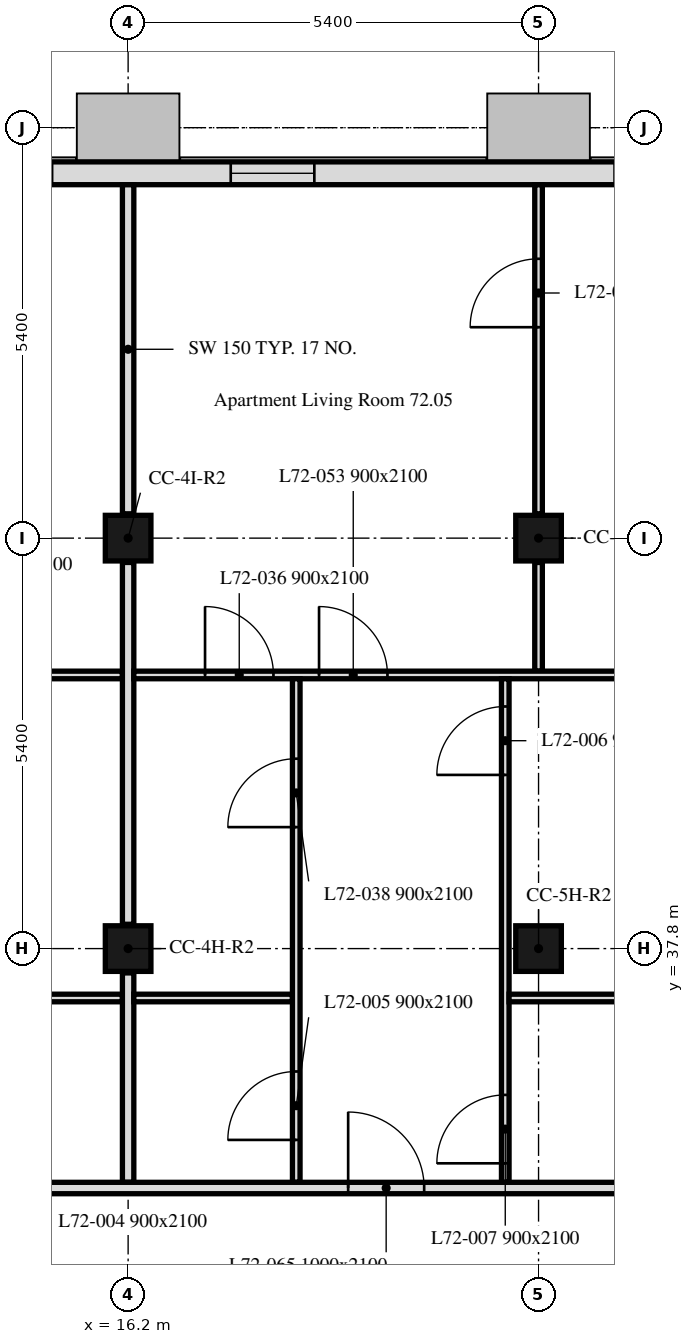
"""IFC4 building model, lengths in metres.
Left out: names, types, materials, properties, quantities, classifications, styles, units other than length and angle.
Written with IfcOpenShell. Run it as: python <this file> out.ifc"""

import sys

from ifc_helpers import new_model, si_unit, direction, frame, frame_2d, origin, origin_2d, place, context, subcontext, project, spatial, rectangle, extrude, element, fill, save


model = new_model("IFC4")
c1 = context("Model", 3, precision=1e-05, world=origin(), true_north=direction((0.0, 1.0)))
c2 = subcontext(c1, "Body", "Model", "MODEL_VIEW")
j1 = project(units=[si_unit("LENGTHUNIT", "METRE"), si_unit("PLANEANGLEUNIT", "RADIAN")], contexts=[c1])
p1 = place(None, origin())
s1 = spatial("IfcSite", under=j1, at=p1, CompositionType="ELEMENT")
p2 = place(p1, origin())
s2 = spatial("IfcBuilding", under=s1, at=p2, CompositionType="ELEMENT")
p3 = place(p2, frame((0.0, 0.0, 291.7)))
s3 = spatial("IfcBuildingStorey", under=s2, at=p3, CompositionType="ELEMENT", Elevation=291.7)
for number, where, z_axis, x_axis in (
    (1, (16.2, 37.8, 0.0), (0.0, 0.0, 1.0), (1.0, 0.0, 0.0)),
    (2, (21.6, 37.8, 0.0), (0.0, 0.0, 1.0), (1.0, 0.0, 0.0)),
    (3, (16.2, 43.2, 0.0), (0.0, 0.0, 1.0), (1.0, 0.0, 0.0)),
    (4, (21.6, 43.2, 0.0), (0.0, 0.0, 1.0), (1.0, 0.0, 0.0)),
):
    element("IfcColumn", number, at=place(p3, frame(where, z_axis=z_axis, x_axis=x_axis)), inside=s3, PredefinedType="COLUMN", context=c2, shape_type="SweptSolid", body=[
        extrude(rectangle(XDim=0.6, YDim=0.6, at=origin_2d()), origin(), (0.0, 0.0, 1.0), 3.0),
    ])
p4 = place(p3, frame((43.014, 48.0, 0.0), z_axis=(0.0, 0.0, 1.0), x_axis=(-1.0, 0.0, 0.0)))
e5 = element("IfcWall", 5, at=p4, inside=s3, PredefinedType="SOLIDWALL", context=c2, shape_type="SweptSolid", body=[
    extrude(rectangle(XDim=32.027, YDim=0.3, at=frame_2d((16.014, 0.0))), origin(), (0.0, 0.0, 1.0), 3.0),
])
p5 = place(p4, frame((2.764, 0.0, 0.9)))
e6 = element("IfcOpeningElement", 6, at=p5, cuts=e5, PredefinedType="OPENING", context=c2, shape_type="SweptSolid", body=[
    extrude(rectangle(XDim=1.1, YDim=1.7, at=frame_2d((0.55, 0.85))), frame((0.0, 0.16, 0.0), z_axis=(0.0, -1.0, 0.0), x_axis=(1.0, 0.0, 0.0)), (0.0, 0.0, 1.0), 0.32),
])
p6 = place(p4, frame((6.214, 0.0, 0.9)))
e7 = element("IfcOpeningElement", 7, at=p6, cuts=e5, PredefinedType="OPENING", context=c2, shape_type="SweptSolid", body=[
    extrude(rectangle(XDim=3.4, YDim=1.7, at=frame_2d((1.7, 0.85))), frame((0.0, 0.16, 0.0), z_axis=(0.0, -1.0, 0.0), x_axis=(1.0, 0.0, 0.0)), (0.0, 0.0, 1.0), 0.32),
])
p7 = place(p4, frame((13.564, 0.0, 0.9)))
e8 = element("IfcOpeningElement", 8, at=p7, cuts=e5, PredefinedType="OPENING", context=c2, shape_type="SweptSolid", body=[
    extrude(rectangle(XDim=1.1, YDim=1.7, at=frame_2d((0.55, 0.85))), frame((0.0, 0.16, 0.0), z_axis=(0.0, -1.0, 0.0), x_axis=(1.0, 0.0, 0.0)), (0.0, 0.0, 1.0), 0.32),
])
p8 = place(p4, frame((17.014, 0.0, 0.9)))
e9 = element("IfcOpeningElement", 9, at=p8, cuts=e5, PredefinedType="OPENING", context=c2, shape_type="SweptSolid", body=[
    extrude(rectangle(XDim=3.4, YDim=1.7, at=frame_2d((1.7, 0.85))), frame((0.0, 0.16, 0.0), z_axis=(0.0, -1.0, 0.0), x_axis=(1.0, 0.0, 0.0)), (0.0, 0.0, 1.0), 0.32),
])
p9 = place(p4, frame((24.364, 0.0, 0.9)))
e10 = element("IfcOpeningElement", 10, at=p9, cuts=e5, PredefinedType="OPENING", context=c2, shape_type="SweptSolid", body=[
    extrude(rectangle(XDim=1.1, YDim=1.7, at=frame_2d((0.55, 0.85))), frame((0.0, 0.16, 0.0), z_axis=(0.0, -1.0, 0.0), x_axis=(1.0, 0.0, 0.0)), (0.0, 0.0, 1.0), 0.32),
])
p10 = place(p4, frame((27.814, 0.0, 0.9)))
e11 = element("IfcOpeningElement", 11, at=p10, cuts=e5, PredefinedType="OPENING", context=c2, shape_type="SweptSolid", body=[
    extrude(rectangle(XDim=3.4, YDim=1.7, at=frame_2d((1.7, 0.85))), frame((0.0, 0.16, 0.0), z_axis=(0.0, -1.0, 0.0), x_axis=(1.0, 0.0, 0.0)), (0.0, 0.0, 1.0), 0.32),
])
p11 = place(p3, frame((10.89, 41.4, 0.0), z_axis=(0.0, 0.0, 1.0), x_axis=(1.0, 0.0, 0.0)))
e12 = element("IfcWall", 12, at=p11, inside=s3, PredefinedType="PARTITIONING", context=c2, shape_type="SweptSolid", body=[
    extrude(rectangle(XDim=5.235, YDim=0.1, at=frame_2d((2.618, 0.0))), origin(), (0.0, 0.0, 1.0), 3.0),
])
p12 = place(p11, frame((3.15, 0.0, 0.0)))
e13 = element("IfcOpeningElement", 13, at=p12, cuts=e12, PredefinedType="OPENING", context=c2, shape_type="SweptSolid", body=[
    extrude(rectangle(XDim=0.9, YDim=2.1, at=frame_2d((0.45, 1.05))), frame((0.0, 0.05, 0.0), z_axis=(0.0, -1.0, 0.0), x_axis=(1.0, 0.0, 0.0)), (0.0, 0.0, 1.0), 0.1),
])
p13 = place(p3, frame((16.2, 43.52, 0.0), z_axis=(0.0, 0.0, 1.0), x_axis=(0.0, 1.0, 0.0)))
e14 = element("IfcWall", 14, at=p13, inside=s3, PredefinedType="PARTITIONING", context=c2, shape_type="SweptSolid", body=[
    extrude(rectangle(XDim=4.329, YDim=0.15, at=frame_2d((2.165, 0.0))), origin(), (0.0, 0.0, 1.0), 2.4),
])
p14 = place(p3, frame((10.99, 37.15, 0.0), z_axis=(0.0, 0.0, 1.0), x_axis=(1.0, 0.0, 0.0)))
e15 = element("IfcWall", 15, at=p14, inside=s3, PredefinedType="PARTITIONING", context=c2, shape_type="SweptSolid", body=[
    extrude(rectangle(XDim=5.135, YDim=0.1, at=frame_2d((2.567, 0.0))), origin(), (0.0, 0.0, 1.0), 3.0),
])
p15 = place(p14, frame((3.12, 0.0, 0.0)))
e16 = element("IfcOpeningElement", 16, at=p15, cuts=e15, PredefinedType="OPENING", context=c2, shape_type="SweptSolid", body=[
    extrude(rectangle(XDim=0.9, YDim=2.1, at=frame_2d((0.45, 1.05))), frame((0.0, 0.05, 0.0), z_axis=(0.0, -1.0, 0.0), x_axis=(1.0, 0.0, 0.0)), (0.0, 0.0, 1.0), 0.1),
])
p16 = place(p3, frame((16.2, 38.12, 0.0), z_axis=(0.0, 0.0, 1.0), x_axis=(0.0, 1.0, 0.0)))
e17 = element("IfcWall", 17, at=p16, inside=s3, PredefinedType="PARTITIONING", context=c2, shape_type="SweptSolid", body=[
    extrude(rectangle(XDim=4.76, YDim=0.15, at=frame_2d((2.38, 0.0))), origin(), (0.0, 0.0, 1.0), 2.4),
])
p17 = place(p3, frame((16.2, 34.725, 0.0), z_axis=(0.0, 0.0, 1.0), x_axis=(0.0, 1.0, 0.0)))
e18 = element("IfcWall", 18, at=p17, inside=s3, PredefinedType="PARTITIONING", context=c2, shape_type="SweptSolid", body=[
    extrude(rectangle(XDim=2.755, YDim=0.15, at=frame_2d((1.377, 0.0))), origin(), (0.0, 0.0, 1.0), 2.4),
])
p18 = place(p3, frame((21.6, 41.45, 0.0), z_axis=(0.0, 0.0, 1.0), x_axis=(0.0, 1.0, 0.0)))
e19 = element("IfcWall", 19, at=p18, inside=s3, PredefinedType="PARTITIONING", context=c2, shape_type="SweptSolid", body=[
    extrude(rectangle(XDim=1.43, YDim=0.1, at=frame_2d((0.715, 0.0))), origin(), (0.0, 0.0, 1.0), 2.4),
])
p19 = place(p3, frame((21.6, 43.52, 0.0), z_axis=(0.0, 0.0, 1.0), x_axis=(0.0, 1.0, 0.0)))
e20 = element("IfcWall", 20, at=p19, inside=s3, PredefinedType="PARTITIONING", context=c2, shape_type="SweptSolid", body=[
    extrude(rectangle(XDim=4.329, YDim=0.1, at=frame_2d((2.165, 0.0))), origin(), (0.0, 0.0, 1.0), 2.4),
])
p20 = place(p19, frame((2.455, 0.0, 0.0)))
e21 = element("IfcOpeningElement", 21, at=p20, cuts=e20, PredefinedType="OPENING", context=c2, shape_type="SweptSolid", body=[
    extrude(rectangle(XDim=0.9, YDim=2.1, at=frame_2d((0.45, 1.05))), frame((0.0, 0.05, 0.0), z_axis=(0.0, -1.0, 0.0), x_axis=(1.0, 0.0, 0.0)), (0.0, 0.0, 1.0), 0.1),
])
p21 = place(p3, frame((16.275, 41.4, 0.0), z_axis=(0.0, 0.0, 1.0), x_axis=(1.0, 0.0, 0.0)))
e22 = element("IfcWall", 22, at=p21, inside=s3, PredefinedType="PARTITIONING", context=c2, shape_type="SweptSolid", body=[
    extrude(rectangle(XDim=10.65, YDim=0.1, at=frame_2d((5.325, 0.0))), origin(), (0.0, 0.0, 1.0), 2.4),
])
p22 = place(p21, frame((0.937, 0.0, 0.0)))
e23 = element("IfcOpeningElement", 23, at=p22, cuts=e22, PredefinedType="OPENING", context=c2, shape_type="SweptSolid", body=[
    extrude(rectangle(XDim=0.9, YDim=2.1, at=frame_2d((0.45, 1.05))), frame((0.0, 0.05, 0.0), z_axis=(0.0, -1.0, 0.0), x_axis=(1.0, 0.0, 0.0)), (0.0, 0.0, 1.0), 0.1),
])
p23 = place(p21, frame((8.075, 0.0, 0.0)))
e24 = element("IfcOpeningElement", 24, at=p23, cuts=e22, PredefinedType="OPENING", context=c2, shape_type="SweptSolid", body=[
    extrude(rectangle(XDim=0.9, YDim=2.1, at=frame_2d((0.45, 1.05))), frame((0.0, 0.05, 0.0), z_axis=(0.0, -1.0, 0.0), x_axis=(1.0, 0.0, 0.0)), (0.0, 0.0, 1.0), 0.1),
])
p24 = place(p21, frame((2.437, 0.0, 0.0)))
e25 = element("IfcOpeningElement", 25, at=p24, cuts=e22, PredefinedType="OPENING", context=c2, shape_type="SweptSolid", body=[
    extrude(rectangle(XDim=0.9, YDim=2.1, at=frame_2d((0.45, 1.05))), frame((0.0, 0.05, 0.0), z_axis=(0.0, -1.0, 0.0), x_axis=(1.0, 0.0, 0.0)), (0.0, 0.0, 1.0), 0.1),
])
p25 = place(p3, frame((16.275, 37.15, 0.0), z_axis=(0.0, 0.0, 1.0), x_axis=(1.0, 0.0, 0.0)))
e26 = element("IfcWall", 26, at=p25, inside=s3, PredefinedType="PARTITIONING", context=c2, shape_type="SweptSolid", body=[
    extrude(rectangle(XDim=2.087, YDim=0.1, at=frame_2d((1.043, 0.0))), origin(), (0.0, 0.0, 1.0), 3.0),
])
p26 = place(p3, frame((18.412, 34.725, 0.0), z_axis=(0.0, 0.0, 1.0), x_axis=(0.0, 1.0, 0.0)))
e27 = element("IfcWall", 27, at=p26, inside=s3, PredefinedType="PARTITIONING", context=c2, shape_type="SweptSolid", body=[
    extrude(rectangle(XDim=6.625, YDim=0.1, at=frame_2d((3.312, 0.0))), origin(), (0.0, 0.0, 1.0), 3.0),
])
p27 = place(p26, frame((0.558, 0.0, 0.0)))
e28 = element("IfcOpeningElement", 28, at=p27, cuts=e27, PredefinedType="OPENING", context=c2, shape_type="SweptSolid", body=[
    extrude(rectangle(XDim=0.9, YDim=2.1, at=frame_2d((0.45, 1.05))), frame((0.0, 0.05, 0.0), z_axis=(0.0, -1.0, 0.0), x_axis=(1.0, 0.0, 0.0)), (0.0, 0.0, 1.0), 0.1),
])
p28 = place(p26, frame((4.673, 0.0, 0.0)))
e29 = element("IfcOpeningElement", 29, at=p28, cuts=e27, PredefinedType="OPENING", context=c2, shape_type="SweptSolid", body=[
    extrude(rectangle(XDim=0.9, YDim=2.1, at=frame_2d((0.45, 1.05))), frame((0.0, 0.05, 0.0), z_axis=(0.0, -1.0, 0.0), x_axis=(1.0, 0.0, 0.0)), (0.0, 0.0, 1.0), 0.1),
])
p29 = place(p3, frame((21.162, 34.725, 0.0), z_axis=(0.0, 0.0, 1.0), x_axis=(0.0, 1.0, 0.0)))
e30 = element("IfcWall", 30, at=p29, inside=s3, PredefinedType="PARTITIONING", context=c2, shape_type="SweptSolid", body=[
    extrude(rectangle(XDim=6.625, YDim=0.1, at=frame_2d((3.312, 0.0))), origin(), (0.0, 0.0, 1.0), 3.0),
])
p30 = place(p29, frame((5.36, 0.0, 0.0)))
e31 = element("IfcOpeningElement", 31, at=p30, cuts=e30, PredefinedType="OPENING", context=c2, shape_type="SweptSolid", body=[
    extrude(rectangle(XDim=0.9, YDim=2.1, at=frame_2d((0.45, 1.05))), frame((0.0, 0.05, 0.0), z_axis=(0.0, -1.0, 0.0), x_axis=(1.0, 0.0, 0.0)), (0.0, 0.0, 1.0), 0.1),
])
p31 = place(p29, frame((0.25, 0.0, 0.0)))
e32 = element("IfcOpeningElement", 32, at=p31, cuts=e30, PredefinedType="OPENING", context=c2, shape_type="SweptSolid", body=[
    extrude(rectangle(XDim=0.9, YDim=2.1, at=frame_2d((0.45, 1.05))), frame((0.0, 0.05, 0.0), z_axis=(0.0, -1.0, 0.0), x_axis=(1.0, 0.0, 0.0)), (0.0, 0.0, 1.0), 0.1),
])
p32 = place(p3, frame((21.212, 37.15, 0.0), z_axis=(0.0, 0.0, 1.0), x_axis=(1.0, 0.0, 0.0)))
e33 = element("IfcWall", 33, at=p32, inside=s3, PredefinedType="PARTITIONING", context=c2, shape_type="SweptSolid", body=[
    extrude(rectangle(XDim=5.713, YDim=0.1, at=frame_2d((2.856, 0.0))), origin(), (0.0, 0.0, 1.0), 2.4),
])
p33 = place(p32, frame((3.138, 0.0, 0.0)))
e34 = element("IfcOpeningElement", 34, at=p33, cuts=e33, PredefinedType="OPENING", context=c2, shape_type="SweptSolid", body=[
    extrude(rectangle(XDim=0.9, YDim=2.1, at=frame_2d((0.45, 1.05))), frame((0.0, 0.05, 0.0), z_axis=(0.0, -1.0, 0.0), x_axis=(1.0, 0.0, 0.0)), (0.0, 0.0, 1.0), 0.1),
])
p34 = place(p3, frame((6.151, 34.65, 0.0), z_axis=(0.0, 0.0, 1.0), x_axis=(1.0, 0.0, 0.0)))
e35 = element("IfcWall", 35, at=p34, inside=s3, PredefinedType="PARTITIONING", context=c2, shape_type="SweptSolid", body=[
    extrude(rectangle(XDim=41.698, YDim=0.15, at=frame_2d((20.849, 0.0))), origin(), (0.0, 0.0, 1.0), 2.4),
])
p35 = place(p34, frame((2.969, 0.0, 0.0)))
e36 = element("IfcOpeningElement", 36, at=p35, cuts=e35, PredefinedType="OPENING", context=c2, shape_type="SweptSolid", body=[
    extrude(rectangle(XDim=1.0, YDim=2.1, at=frame_2d((0.5, 1.05))), frame((0.0, 0.075, 0.0), z_axis=(0.0, -1.0, 0.0), x_axis=(1.0, 0.0, 0.0)), (0.0, 0.0, 1.0), 0.15),
])
p36 = place(p34, frame((12.944, 0.0, 0.0)))
e37 = element("IfcOpeningElement", 37, at=p36, cuts=e35, PredefinedType="OPENING", context=c2, shape_type="SweptSolid", body=[
    extrude(rectangle(XDim=1.0, YDim=2.1, at=frame_2d((0.5, 1.05))), frame((0.0, 0.075, 0.0), z_axis=(0.0, -1.0, 0.0), x_axis=(1.0, 0.0, 0.0)), (0.0, 0.0, 1.0), 0.15),
])
p37 = place(p34, frame((24.444, 0.0, 0.0)))
e38 = element("IfcOpeningElement", 38, at=p37, cuts=e35, PredefinedType="OPENING", context=c2, shape_type="SweptSolid", body=[
    extrude(rectangle(XDim=1.0, YDim=2.1, at=frame_2d((0.5, 1.05))), frame((0.0, 0.075, 0.0), z_axis=(0.0, -1.0, 0.0), x_axis=(1.0, 0.0, 0.0)), (0.0, 0.0, 1.0), 0.15),
])
p38 = place(p34, frame((34.964, 0.0, 0.0)))
e39 = element("IfcOpeningElement", 39, at=p38, cuts=e35, PredefinedType="OPENING", context=c2, shape_type="SweptSolid", body=[
    extrude(rectangle(XDim=1.0, YDim=2.1, at=frame_2d((0.5, 1.05))), frame((0.0, 0.075, 0.0), z_axis=(0.0, -1.0, 0.0), x_axis=(1.0, 0.0, 0.0)), (0.0, 0.0, 1.0), 0.15),
])
p39 = place(p9, origin())
e40 = element("IfcWindow", 40, at=p39, inside=s3, PartitioningType="SINGLE_PANEL", PredefinedType="WINDOW", context=c2, shape_type="SweptSolid", body=[
    extrude(rectangle(XDim=1.1, YDim=1.7, at=frame_2d((0.55, 0.85))), frame((0.0, 0.03, 0.0), z_axis=(0.0, -1.0, 0.0), x_axis=(1.0, 0.0, 0.0)), (0.0, 0.0, 1.0), 0.06),
])
fill(e10, e40)
p40 = place(p27, origin())
e41 = element("IfcDoor", 41, at=p40, inside=s3, OperationType="SINGLE_SWING_RIGHT", PredefinedType="DOOR", context=c2, shape_type="SweptSolid", body=[
    extrude(rectangle(XDim=0.9, YDim=2.1, at=frame_2d((0.45, 1.05))), frame((0.0, 0.025, 0.0), z_axis=(0.0, -1.0, 0.0), x_axis=(1.0, 0.0, 0.0)), (0.0, 0.0, 1.0), 0.05),
])
fill(e28, e41)
p41 = place(p30, origin())
e42 = element("IfcDoor", 42, at=p41, inside=s3, OperationType="SINGLE_SWING_LEFT", PredefinedType="DOOR", context=c2, shape_type="SweptSolid", body=[
    extrude(rectangle(XDim=0.9, YDim=2.1, at=frame_2d((0.45, 1.05))), frame((0.0, 0.025, 0.0), z_axis=(0.0, -1.0, 0.0), x_axis=(1.0, 0.0, 0.0)), (0.0, 0.0, 1.0), 0.05),
])
fill(e31, e42)
p42 = place(p31, origin())
e43 = element("IfcDoor", 43, at=p42, inside=s3, OperationType="SINGLE_SWING_LEFT", PredefinedType="DOOR", context=c2, shape_type="SweptSolid", body=[
    extrude(rectangle(XDim=0.9, YDim=2.1, at=frame_2d((0.45, 1.05))), frame((0.0, 0.025, 0.0), z_axis=(0.0, -1.0, 0.0), x_axis=(1.0, 0.0, 0.0)), (0.0, 0.0, 1.0), 0.05),
])
fill(e32, e43)
p43 = place(p20, origin())
e44 = element("IfcDoor", 44, at=p43, inside=s3, OperationType="SINGLE_SWING_LEFT", PredefinedType="DOOR", context=c2, shape_type="SweptSolid", body=[
    extrude(rectangle(XDim=0.9, YDim=2.1, at=frame_2d((0.45, 1.05))), frame((0.0, 0.025, 0.0), z_axis=(0.0, -1.0, 0.0), x_axis=(1.0, 0.0, 0.0)), (0.0, 0.0, 1.0), 0.05),
])
fill(e21, e44)
p44 = place(p22, origin())
e45 = element("IfcDoor", 45, at=p44, inside=s3, OperationType="SINGLE_SWING_LEFT", PredefinedType="DOOR", context=c2, shape_type="SweptSolid", body=[
    extrude(rectangle(XDim=0.9, YDim=2.1, at=frame_2d((0.45, 1.05))), frame((0.0, 0.025, 0.0), z_axis=(0.0, -1.0, 0.0), x_axis=(1.0, 0.0, 0.0)), (0.0, 0.0, 1.0), 0.05),
])
fill(e23, e45)
p45 = place(p28, origin())
e46 = element("IfcDoor", 46, at=p45, inside=s3, OperationType="SINGLE_SWING_LEFT", PredefinedType="DOOR", context=c2, shape_type="SweptSolid", body=[
    extrude(rectangle(XDim=0.9, YDim=2.1, at=frame_2d((0.45, 1.05))), frame((0.0, 0.025, 0.0), z_axis=(0.0, -1.0, 0.0), x_axis=(1.0, 0.0, 0.0)), (0.0, 0.0, 1.0), 0.05),
])
fill(e29, e46)
p46 = place(p24, origin())
e47 = element("IfcDoor", 47, at=p46, inside=s3, OperationType="SINGLE_SWING_RIGHT", PredefinedType="DOOR", context=c2, shape_type="SweptSolid", body=[
    extrude(rectangle(XDim=0.9, YDim=2.1, at=frame_2d((0.45, 1.05))), frame((0.0, 0.025, 0.0), z_axis=(0.0, -1.0, 0.0), x_axis=(1.0, 0.0, 0.0)), (0.0, 0.0, 1.0), 0.05),
])
fill(e25, e47)
p47 = place(p36, origin())
e48 = element("IfcDoor", 48, at=p47, inside=s3, OperationType="SINGLE_SWING_RIGHT", PredefinedType="DOOR", context=c2, shape_type="SweptSolid", body=[
    extrude(rectangle(XDim=1.0, YDim=2.1, at=frame_2d((0.5, 1.05))), frame((0.0, 0.025, 0.0), z_axis=(0.0, -1.0, 0.0), x_axis=(1.0, 0.0, 0.0)), (0.0, 0.0, 1.0), 0.05),
])
fill(e37, e48)
save(model, sys.argv[1])
